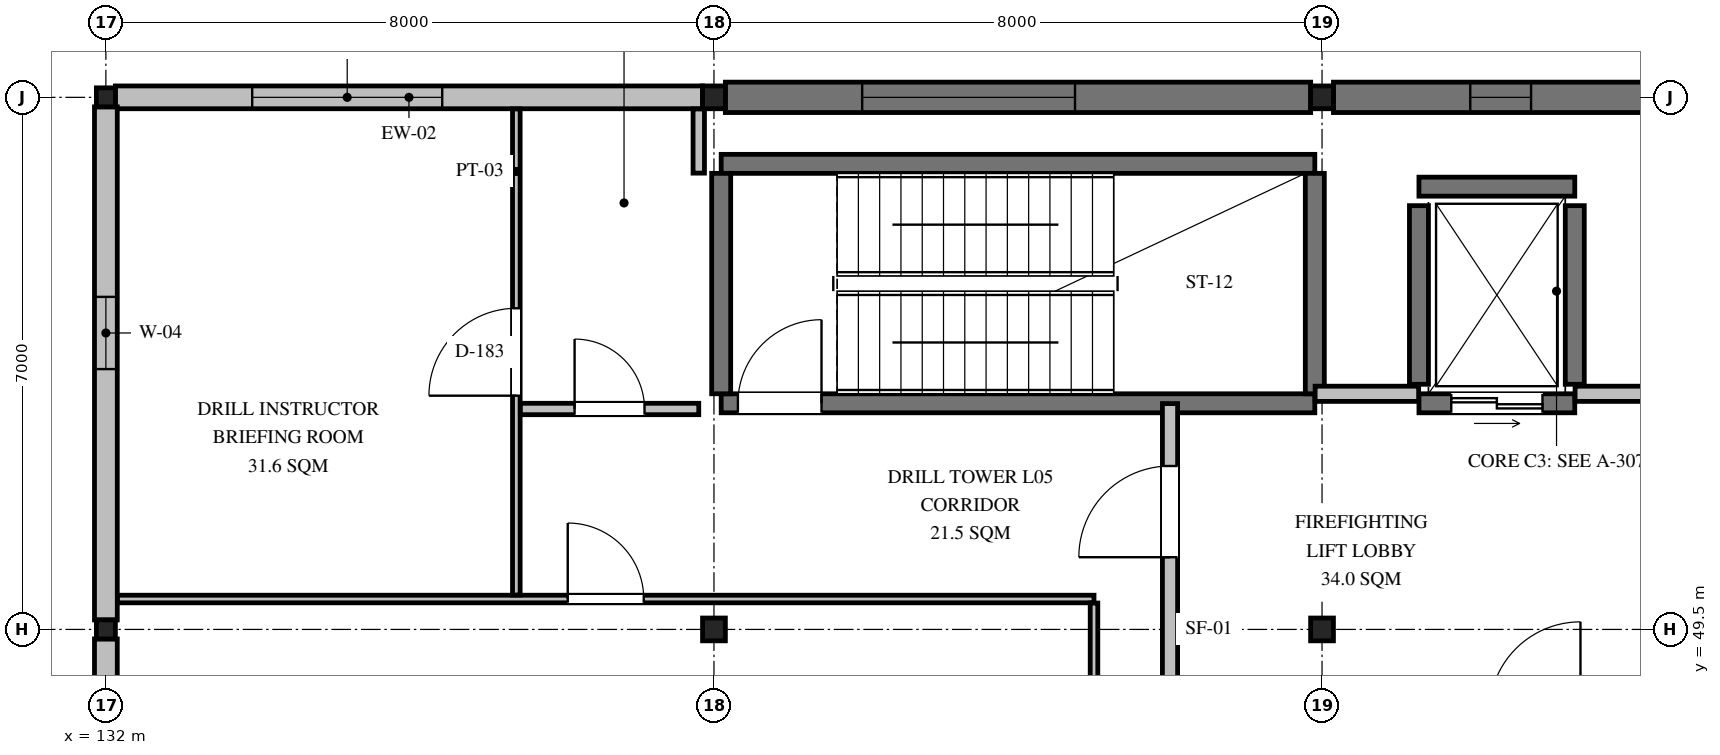
"""IFC4 building model, lengths in metres.
Left out: names, types, materials, properties, quantities, classifications, styles, units other than length and angle.
Written with IfcOpenShell. Run it as: python <this file> out.ifc"""

import sys

from ifc_helpers import new_model, si_unit, direction, frame, frame_2d, origin, origin_2d, place, context, subcontext, project, spatial, rectangle, i_section, extrude, element, fill, save


model = new_model("IFC4")
c1 = context("Model", 3, precision=1e-05, world=origin(), true_north=direction((0.0, 1.0)))
c2 = subcontext(c1, "Body", "Model", "MODEL_VIEW")
j1 = project(units=[si_unit("LENGTHUNIT", "METRE"), si_unit("PLANEANGLEUNIT", "RADIAN")], contexts=[c1])
p1 = place(None, origin())
s1 = spatial("IfcSite", under=j1, at=p1, CompositionType="ELEMENT")
p2 = place(p1, origin())
s2 = spatial("IfcBuilding", under=s1, at=p2, CompositionType="ELEMENT")
p3 = place(p2, frame((0.0, 0.0, 18.45)))
s3 = spatial("IfcBuildingStorey", under=s2, at=p3, CompositionType="ELEMENT", Elevation=18.45)
for number, where, z_axis, x_axis in (
    (1, (132.0, 49.5, 0.0), (0.0, 0.0, 1.0), (1.0, 0.0, 0.0)),
    (2, (132.0, 56.5, 0.0), (0.0, 0.0, 1.0), (1.0, 0.0, 0.0)),
):
    element("IfcColumn", number, at=place(p3, frame(where, z_axis=z_axis, x_axis=x_axis)), inside=s3, PredefinedType="COLUMN", context=c2, shape_type="SweptSolid", body=[
        extrude(i_section(OverallWidth=0.25, OverallDepth=0.25, WebThickness=0.009, FlangeThickness=0.014, FilletRadius=0.016, at=origin_2d()), origin(), (0.0, 0.0, 1.0), 4.2),
    ])
for number, where, z_axis, x_axis in (
    (3, (140.0, 49.5, 0.0), (0.0, 0.0, 1.0), (1.0, 0.0, 0.0)),
    (4, (140.0, 56.5, 0.0), (0.0, 0.0, 1.0), (1.0, 0.0, 0.0)),
    (5, (148.0, 49.5, 0.0), (0.0, 0.0, 1.0), (1.0, 0.0, 0.0)),
    (6, (148.0, 56.5, 0.0), (0.0, 0.0, 1.0), (1.0, 0.0, 0.0)),
):
    element("IfcColumn", number, at=place(p3, frame(where, z_axis=z_axis, x_axis=x_axis)), inside=s3, PredefinedType="COLUMN", context=c2, shape_type="SweptSolid", body=[
        extrude(i_section(OverallWidth=0.3, OverallDepth=0.3, WebThickness=0.01, FlangeThickness=0.015, FilletRadius=0.018, at=origin_2d()), origin(), (0.0, 0.0, 1.0), 4.2),
    ])
p4 = place(p3, frame((132.125, 56.5, 0.0), z_axis=(0.0, 0.0, 1.0), x_axis=(1.0, 0.0, 0.0)))
e7 = element("IfcWall", 7, at=p4, inside=s3, PredefinedType="SOLIDWALL", context=c2, shape_type="SweptSolid", body=[
    extrude(rectangle(XDim=7.725, YDim=0.3, at=frame_2d((3.863, 0.0))), origin(), (0.0, 0.0, 1.0), 3.344),
])
p5 = place(p4, frame((1.8, 0.0, 0.9)))
e8 = element("IfcOpeningElement", 8, at=p5, cuts=e7, PredefinedType="OPENING", context=c2, shape_type="SweptSolid", body=[
    extrude(rectangle(XDim=2.5, YDim=2.1, at=frame_2d((1.25, 1.05))), frame((0.0, 0.16, 0.0), z_axis=(0.0, -1.0, 0.0), x_axis=(1.0, 0.0, 0.0)), (0.0, 0.0, 1.0), 0.32),
])
p6 = place(p3, frame((140.15, 56.5, 0.0), z_axis=(0.0, 0.0, 1.0), x_axis=(1.0, 0.0, 0.0)))
e9 = element("IfcWall", 9, at=p6, inside=s3, PredefinedType="SHEAR", context=c2, shape_type="SweptSolid", body=[
    extrude(rectangle(XDim=7.7, YDim=0.4, at=frame_2d((3.85, 0.0))), origin(), (0.0, 0.0, 1.0), 4.0),
])
p7 = place(p6, frame((1.8, 0.0, 0.9)))
e10 = element("IfcOpeningElement", 10, at=p7, cuts=e9, PredefinedType="OPENING", context=c2, shape_type="SweptSolid", body=[
    extrude(rectangle(XDim=2.8, YDim=1.2, at=frame_2d((1.4, 0.6))), frame((0.0, 0.21, 0.0), z_axis=(0.0, -1.0, 0.0), x_axis=(1.0, 0.0, 0.0)), (0.0, 0.0, 1.0), 0.42),
])
p8 = place(p3, frame((148.15, 56.5, 0.0), z_axis=(0.0, 0.0, 1.0), x_axis=(1.0, 0.0, 0.0)))
e11 = element("IfcWall", 11, at=p8, inside=s3, PredefinedType="SHEAR", context=c2, shape_type="SweptSolid", body=[
    extrude(rectangle(XDim=12.7, YDim=0.4, at=frame_2d((6.35, 0.0))), origin(), (0.0, 0.0, 1.0), 4.0),
])
p9 = place(p8, frame((1.8, 0.0, 0.9)))
e12 = element("IfcOpeningElement", 12, at=p9, cuts=e11, PredefinedType="OPENING", context=c2, shape_type="SweptSolid", body=[
    extrude(rectangle(XDim=0.8, YDim=1.3, at=frame_2d((0.4, 0.65))), frame((0.0, 0.21, 0.0), z_axis=(0.0, -1.0, 0.0), x_axis=(1.0, 0.0, 0.0)), (0.0, 0.0, 1.0), 0.42),
])
p10 = place(p3, frame((132.0, 42.625, 0.0), z_axis=(0.0, 0.0, 1.0), x_axis=(0.0, 1.0, 0.0)))
e13 = element("IfcWall", 13, at=p10, inside=s3, PredefinedType="SOLIDWALL", context=c2, shape_type="SweptSolid", body=[
    extrude(rectangle(XDim=6.75, YDim=0.3, at=frame_2d((3.375, 0.0))), origin(), (0.0, 0.0, 1.0), 3.494),
])
p11 = place(p10, frame((1.9, 0.0, 0.85)))
e14 = element("IfcOpeningElement", 14, at=p11, cuts=e13, PredefinedType="OPENING", context=c2, shape_type="SweptSolid", body=[
    extrude(rectangle(XDim=1.3, YDim=1.3, at=frame_2d((0.65, 0.65))), frame((0.0, 0.16, 0.0), z_axis=(0.0, -1.0, 0.0), x_axis=(1.0, 0.0, 0.0)), (0.0, 0.0, 1.0), 0.32),
])
p12 = place(p3, frame((132.0, 49.625, 0.0), z_axis=(0.0, 0.0, 1.0), x_axis=(0.0, 1.0, 0.0)))
e15 = element("IfcWall", 15, at=p12, inside=s3, PredefinedType="SOLIDWALL", context=c2, shape_type="SweptSolid", body=[
    extrude(rectangle(XDim=6.75, YDim=0.3, at=frame_2d((3.375, 0.0))), origin(), (0.0, 0.0, 1.0), 3.544),
])
p13 = place(p12, frame((3.3, 0.0, 1.05)))
e16 = element("IfcOpeningElement", 16, at=p13, cuts=e15, PredefinedType="OPENING", context=c2, shape_type="SweptSolid", body=[
    extrude(rectangle(XDim=0.95, YDim=0.95, at=frame_2d((0.475, 0.475))), frame((0.0, 0.16, 0.0), z_axis=(0.0, -1.0, 0.0), x_axis=(1.0, 0.0, 0.0)), (0.0, 0.0, 1.0), 0.32),
])
p14 = place(p3, frame((140.095, 52.475, 0.0), z_axis=(0.0, 0.0, 1.0), x_axis=(1.0, 0.0, 0.0)))
e17 = element("IfcWall", 17, at=p14, inside=s3, PredefinedType="SHEAR", context=c2, shape_type="SweptSolid", body=[
    extrude(rectangle(XDim=7.81, YDim=0.25, at=frame_2d((3.905, 0.0))), origin(), (0.0, 0.0, 1.0), 4.0),
])
p15 = place(p14, frame((0.22, 0.0, 0.0)))
e18 = element("IfcOpeningElement", 18, at=p15, cuts=e17, PredefinedType="OPENING", context=c2, shape_type="SweptSolid", body=[
    extrude(rectangle(XDim=1.1, YDim=2.15, at=frame_2d((0.55, 1.075))), frame((0.0, 0.135, 0.0), z_axis=(0.0, -1.0, 0.0), x_axis=(1.0, 0.0, 0.0)), (0.0, 0.0, 1.0), 0.27),
])
p16 = place(p3, frame((140.095, 55.625, 0.0), z_axis=(0.0, 0.0, 1.0), x_axis=(1.0, 0.0, 0.0)))
e19 = element("IfcWall", 19, at=p16, inside=s3, PredefinedType="SHEAR", context=c2, shape_type="SweptSolid", body=[
    extrude(rectangle(XDim=7.81, YDim=0.25, at=frame_2d((3.905, 0.0))), origin(), (0.0, 0.0, 1.0), 4.0),
])
for number, where, z_axis, x_axis in (
    (20, (140.095, 52.6, 0.0), (0.0, 0.0, 1.0), (0.0, 1.0, 0.0)),
    (21, (147.905, 52.6, 0.0), (0.0, 0.0, 1.0), (0.0, 1.0, 0.0)),
):
    element("IfcWall", number, at=place(p3, frame(where, z_axis=z_axis, x_axis=x_axis)), inside=s3, PredefinedType="SHEAR", context=c2, shape_type="SweptSolid", body=[
        extrude(rectangle(XDim=2.9, YDim=0.25, at=frame_2d((1.45, 0.0))), origin(), (0.0, 0.0, 1.0), 4.0),
    ])
p17 = place(p3, frame((149.275, 52.475, 0.0), z_axis=(0.0, 0.0, 1.0), x_axis=(1.0, 0.0, 0.0)))
e22 = element("IfcWall", 22, at=p17, inside=s3, PredefinedType="SHEAR", context=c2, shape_type="SweptSolid", body=[
    extrude(rectangle(XDim=2.05, YDim=0.25, at=frame_2d((1.025, 0.0))), origin(), (0.0, 0.0, 1.0), 4.0),
])
p18 = place(p17, frame((0.425, 0.0, 0.0)))
e23 = element("IfcOpeningElement", 23, at=p18, cuts=e22, PredefinedType="OPENING", context=c2, shape_type="SweptSolid", body=[
    extrude(rectangle(XDim=1.2, YDim=2.15, at=frame_2d((0.6, 1.075))), frame((0.0, 0.135, 0.0), z_axis=(0.0, -1.0, 0.0), x_axis=(1.0, 0.0, 0.0)), (0.0, 0.0, 1.0), 0.27),
])
p19 = place(p3, frame((149.275, 55.325, 0.0), z_axis=(0.0, 0.0, 1.0), x_axis=(1.0, 0.0, 0.0)))
e24 = element("IfcWall", 24, at=p19, inside=s3, PredefinedType="SHEAR", context=c2, shape_type="SweptSolid", body=[
    extrude(rectangle(XDim=2.05, YDim=0.25, at=frame_2d((1.025, 0.0))), origin(), (0.0, 0.0, 1.0), 4.0),
])
for number, where, z_axis, x_axis in (
    (25, (149.275, 52.725, 0.0), (0.0, 0.0, 1.0), (0.0, 1.0, 0.0)),
    (26, (151.325, 52.725, 0.0), (0.0, 0.0, 1.0), (0.0, 1.0, 0.0)),
):
    element("IfcWall", number, at=place(p3, frame(where, z_axis=z_axis, x_axis=x_axis)), inside=s3, PredefinedType="SHEAR", context=c2, shape_type="SweptSolid", body=[
        extrude(rectangle(XDim=2.35, YDim=0.25, at=frame_2d((1.175, 0.0))), origin(), (0.0, 0.0, 1.0), 4.0),
    ])
p20 = place(p3, frame((147.909, 52.6, 0.0), z_axis=(0.0, 0.0, 1.0), x_axis=(1.0, 0.0, 0.0)))
e27 = element("IfcWall", 27, at=p20, inside=s3, PredefinedType="PARTITIONING", context=c2, shape_type="SweptSolid", body=[
    extrude(rectangle(XDim=1.362, YDim=0.2, at=frame_2d((0.681, 0.0))), origin(), (0.0, 0.0, 1.0), 4.0),
])
p21 = place(p3, frame((151.329, 52.6, 0.0), z_axis=(0.0, 0.0, 1.0), x_axis=(1.0, 0.0, 0.0)))
e28 = element("IfcWall", 28, at=p21, inside=s3, PredefinedType="PARTITIONING", context=c2, shape_type="SweptSolid", body=[
    extrude(rectangle(XDim=1.532, YDim=0.2, at=frame_2d((0.766, 0.0))), origin(), (0.0, 0.0, 1.0), 4.0),
])
p22 = place(p3, frame((146.0, 48.504, 0.0), z_axis=(0.0, 0.0, 1.0), x_axis=(0.0, 1.0, 0.0)))
e29 = element("IfcWall", 29, at=p22, inside=s3, PredefinedType="PARTITIONING", context=c2, shape_type="SweptSolid", body=[
    extrude(rectangle(XDim=3.967, YDim=0.2, at=frame_2d((1.983, 0.0))), origin(), (0.0, 0.0, 1.0), 4.0),
])
p23 = place(p22, frame((1.946, 0.0, 0.0)))
e30 = element("IfcOpeningElement", 30, at=p23, cuts=e29, PredefinedType="OPENING", context=c2, shape_type="SweptSolid", body=[
    extrude(rectangle(XDim=1.2, YDim=2.15, at=frame_2d((0.6, 1.075))), frame((0.0, 0.11, 0.0), z_axis=(0.0, -1.0, 0.0), x_axis=(1.0, 0.0, 0.0)), (0.0, 0.0, 1.0), 0.22),
])
p24 = place(p3, frame((132.153, 49.9, 0.0), z_axis=(0.0, 0.0, 1.0), x_axis=(1.0, 0.0, 0.0)))
e31 = element("IfcWall", 31, at=p24, inside=s3, PredefinedType="PARTITIONING", context=c2, shape_type="SweptSolid", body=[
    extrude(rectangle(XDim=12.847, YDim=0.1, at=frame_2d((6.423, 0.0))), origin(), (0.0, 0.0, 1.0), 4.0),
])
p25 = place(p24, frame((5.924, 0.0, 0.0)))
e32 = element("IfcOpeningElement", 32, at=p25, cuts=e31, PredefinedType="OPENING", context=c2, shape_type="SweptSolid", body=[
    extrude(rectangle(XDim=1.0, YDim=2.1, at=frame_2d((0.5, 1.05))), frame((0.0, 0.06, 0.0), z_axis=(0.0, -1.0, 0.0), x_axis=(1.0, 0.0, 0.0)), (0.0, 0.0, 1.0), 0.12),
])
p26 = place(p3, frame((145.0, 42.583, 0.0), z_axis=(0.0, 0.0, 1.0), x_axis=(0.0, 1.0, 0.0)))
e33 = element("IfcWall", 33, at=p26, inside=s3, PredefinedType="PARTITIONING", context=c2, shape_type="SweptSolid", body=[
    extrude(rectangle(XDim=7.264, YDim=0.1, at=frame_2d((3.632, 0.0))), origin(), (0.0, 0.0, 1.0), 4.0),
])
p27 = place(p3, frame((137.4, 49.953, 0.0), z_axis=(0.0, 0.0, 1.0), x_axis=(0.0, 1.0, 0.0)))
e34 = element("IfcWall", 34, at=p27, inside=s3, PredefinedType="PARTITIONING", context=c2, shape_type="SweptSolid", body=[
    extrude(rectangle(XDim=6.394, YDim=0.1, at=frame_2d((3.197, 0.0))), origin(), (0.0, 0.0, 1.0), 3.7),
])
p28 = place(p27, frame((2.622, 0.0, 0.0)))
e35 = element("IfcOpeningElement", 35, at=p28, cuts=e34, PredefinedType="OPENING", context=c2, shape_type="SweptSolid", body=[
    extrude(rectangle(XDim=1.15, YDim=2.1, at=frame_2d((0.575, 1.05))), frame((0.0, 0.06, 0.0), z_axis=(0.0, -1.0, 0.0), x_axis=(1.0, 0.0, 0.0)), (0.0, 0.0, 1.0), 0.12),
])
p29 = place(p3, frame((137.453, 52.4, 0.0), z_axis=(0.0, 0.0, 1.0), x_axis=(1.0, 0.0, 0.0)))
e36 = element("IfcWall", 36, at=p29, inside=s3, PredefinedType="PARTITIONING", context=c2, shape_type="SweptSolid", body=[
    extrude(rectangle(XDim=2.347, YDim=0.15, at=frame_2d((1.174, 0.0))), origin(), (0.0, 0.0, 1.0), 4.0),
])
p30 = place(p29, frame((0.713, 0.0, 0.0)))
e37 = element("IfcOpeningElement", 37, at=p30, cuts=e36, PredefinedType="OPENING", context=c2, shape_type="SweptSolid", body=[
    extrude(rectangle(XDim=0.92, YDim=2.1, at=frame_2d((0.46, 1.05))), frame((0.0, 0.085, 0.0), z_axis=(0.0, -1.0, 0.0), x_axis=(1.0, 0.0, 0.0)), (0.0, 0.0, 1.0), 0.17),
])
p31 = place(p3, frame((139.8, 55.503, 0.0), z_axis=(0.0, 0.0, 1.0), x_axis=(0.0, 1.0, 0.0)))
e38 = element("IfcWall", 38, at=p31, inside=s3, PredefinedType="PARTITIONING", context=c2, shape_type="SweptSolid", body=[
    extrude(rectangle(XDim=0.844, YDim=0.15, at=frame_2d((0.422, 0.0))), origin(), (0.0, 0.0, 1.0), 4.0),
])
p32 = place(p5, origin())
e39 = element("IfcWindow", 39, at=p32, inside=s3, PartitioningType="SINGLE_PANEL", PredefinedType="WINDOW", context=c2, shape_type="SweptSolid", body=[
    extrude(rectangle(XDim=2.5, YDim=2.1, at=frame_2d((1.25, 1.05))), frame((0.0, 0.03, 0.0), z_axis=(0.0, -1.0, 0.0), x_axis=(1.0, 0.0, 0.0)), (0.0, 0.0, 1.0), 0.06),
])
fill(e8, e39)
p33 = place(p7, origin())
e40 = element("IfcWindow", 40, at=p33, inside=s3, PartitioningType="SINGLE_PANEL", PredefinedType="WINDOW", context=c2, shape_type="SweptSolid", body=[
    extrude(rectangle(XDim=2.8, YDim=1.2, at=frame_2d((1.4, 0.6))), frame((0.0, 0.03, 0.0), z_axis=(0.0, -1.0, 0.0), x_axis=(1.0, 0.0, 0.0)), (0.0, 0.0, 1.0), 0.06),
])
fill(e10, e40)
p34 = place(p9, origin())
e41 = element("IfcWindow", 41, at=p34, inside=s3, PartitioningType="SINGLE_PANEL", PredefinedType="WINDOW", context=c2, shape_type="SweptSolid", body=[
    extrude(rectangle(XDim=0.8, YDim=1.3, at=frame_2d((0.4, 0.65))), frame((0.0, 0.03, 0.0), z_axis=(0.0, -1.0, 0.0), x_axis=(1.0, 0.0, 0.0)), (0.0, 0.0, 1.0), 0.06),
])
fill(e12, e41)
p35 = place(p13, origin())
e42 = element("IfcWindow", 42, at=p35, inside=s3, PartitioningType="SINGLE_PANEL", PredefinedType="WINDOW", context=c2, shape_type="SweptSolid", body=[
    extrude(rectangle(XDim=0.95, YDim=0.95, at=frame_2d((0.475, 0.475))), frame((0.0, 0.03, 0.0), z_axis=(0.0, -1.0, 0.0), x_axis=(1.0, 0.0, 0.0)), (0.0, 0.0, 1.0), 0.06),
])
fill(e16, e42)
p36 = place(p15, frame((1.1, 0.0, 0.0), z_axis=(0.0, 0.0, 1.0), x_axis=(-1.0, 0.0, 0.0)))
e43 = element("IfcDoor", 43, at=p36, inside=s3, OperationType="SINGLE_SWING_RIGHT", PredefinedType="DOOR", context=c2, shape_type="SweptSolid", body=[
    extrude(rectangle(XDim=1.1, YDim=2.15, at=frame_2d((0.55, 1.075))), frame((0.0, 0.025, 0.0), z_axis=(0.0, -1.0, 0.0), x_axis=(1.0, 0.0, 0.0)), (0.0, 0.0, 1.0), 0.05),
])
fill(e18, e43)
p37 = place(p18, origin())
e44 = element("IfcDoor", 44, at=p37, inside=s3, OperationType="DOUBLE_DOOR_SLIDING", PredefinedType="DOOR", context=c2, shape_type="SweptSolid", body=[
    extrude(rectangle(XDim=1.2, YDim=2.15, at=frame_2d((0.6, 1.075))), frame((0.0, 0.025, 0.0), z_axis=(0.0, -1.0, 0.0), x_axis=(1.0, 0.0, 0.0)), (0.0, 0.0, 1.0), 0.05),
])
fill(e23, e44)
p38 = place(p23, origin())
e45 = element("IfcDoor", 45, at=p38, inside=s3, OperationType="SINGLE_SWING_LEFT", PredefinedType="DOOR", context=c2, shape_type="SweptSolid", body=[
    extrude(rectangle(XDim=1.2, YDim=2.15, at=frame_2d((0.6, 1.075))), frame((0.0, 0.025, 0.0), z_axis=(0.0, -1.0, 0.0), x_axis=(1.0, 0.0, 0.0)), (0.0, 0.0, 1.0), 0.05),
])
fill(e30, e45)
p39 = place(p25, origin())
e46 = element("IfcDoor", 46, at=p39, inside=s3, OperationType="SINGLE_SWING_LEFT", PredefinedType="DOOR", context=c2, shape_type="SweptSolid", body=[
    extrude(rectangle(XDim=1.0, YDim=2.1, at=frame_2d((0.5, 1.05))), frame((0.0, 0.025, 0.0), z_axis=(0.0, -1.0, 0.0), x_axis=(1.0, 0.0, 0.0)), (0.0, 0.0, 1.0), 0.05),
])
fill(e32, e46)
p40 = place(p28, origin())
e47 = element("IfcDoor", 47, at=p40, inside=s3, OperationType="SINGLE_SWING_LEFT", PredefinedType="DOOR", context=c2, shape_type="SweptSolid", body=[
    extrude(rectangle(XDim=1.15, YDim=2.1, at=frame_2d((0.575, 1.05))), frame((0.0, 0.025, 0.0), z_axis=(0.0, -1.0, 0.0), x_axis=(1.0, 0.0, 0.0)), (0.0, 0.0, 1.0), 0.05),
])
fill(e35, e47)
p41 = place(p30, origin())
e48 = element("IfcDoor", 48, at=p41, inside=s3, OperationType="SINGLE_SWING_LEFT", PredefinedType="DOOR", context=c2, shape_type="SweptSolid", body=[
    extrude(rectangle(XDim=0.92, YDim=2.1, at=frame_2d((0.46, 1.05))), frame((0.0, 0.025, 0.0), z_axis=(0.0, -1.0, 0.0), x_axis=(1.0, 0.0, 0.0)), (0.0, 0.0, 1.0), 0.05),
])
fill(e37, e48)
save(model, sys.argv[1])
